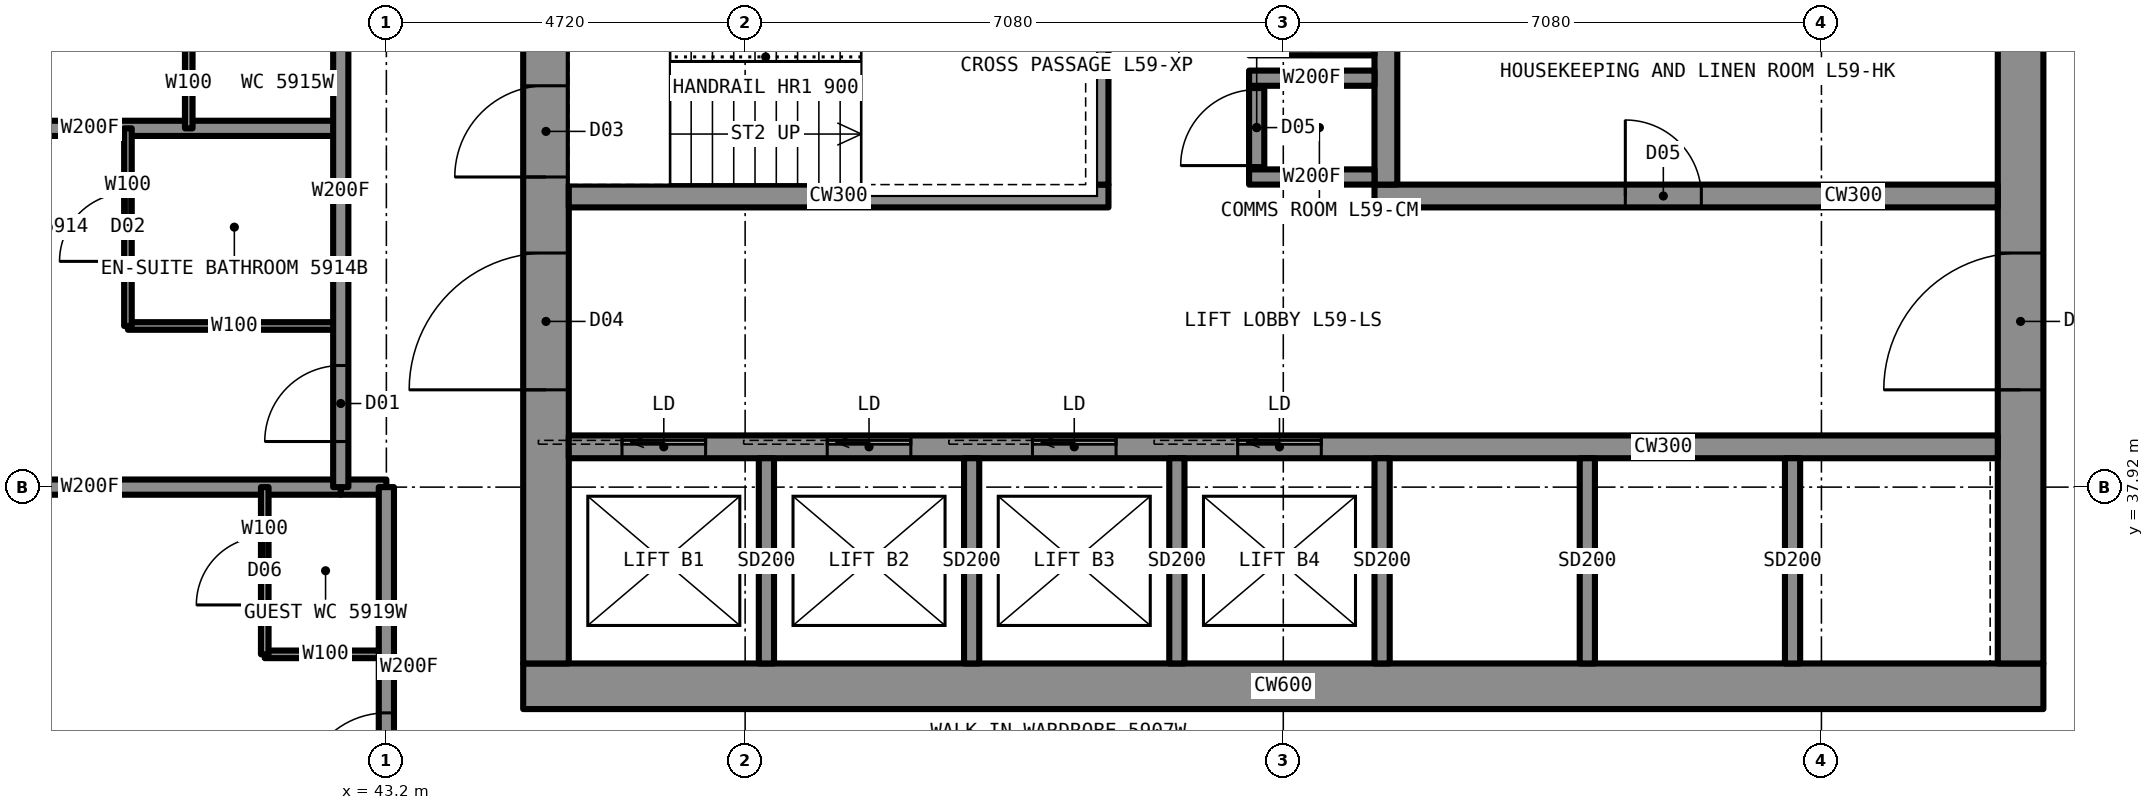
"""IFC4 building model, lengths in metres.
Left out: names, types, materials, properties, quantities, classifications, styles, units other than length and angle.
Written with IfcOpenShell. Run it as: python <this file> out.ifc"""

import sys

from ifc_helpers import new_model, si_unit, direction, frame, frame_2d, origin, place, context, subcontext, project, spatial, rectangle, extrude, element, fill, save


model = new_model("IFC4")
c1 = context("Model", 3, precision=1e-05, world=origin(), true_north=direction((0.0, 1.0)))
c2 = subcontext(c1, "Body", "Model", "MODEL_VIEW")
j1 = project(units=[si_unit("LENGTHUNIT", "METRE"), si_unit("PLANEANGLEUNIT", "RADIAN")], contexts=[c1])
p1 = place(None, origin())
s1 = spatial("IfcSite", under=j1, at=p1, CompositionType="ELEMENT")
p2 = place(p1, origin())
s2 = spatial("IfcBuilding", under=s1, at=p2, CompositionType="ELEMENT")
p3 = place(p2, frame((0.0, 0.0, 214.3)))
s3 = spatial("IfcBuildingStorey", under=s2, at=p3, CompositionType="ELEMENT", Elevation=214.3)
p4 = place(p3, frame((45.0, 35.3, 0.0), z_axis=(0.0, 0.0, 1.0), x_axis=(1.0, 0.0, 0.0)))
e1 = element("IfcWall", 1, at=p4, inside=s3, PredefinedType="SHEAR", context=c2, shape_type="SweptSolid", body=[
    extrude(rectangle(XDim=20.0, YDim=0.6, at=frame_2d((10.0, 0.0))), origin(), (0.0, 0.0, 1.0), 3.5),
])
p5 = place(p3, frame((64.7, 35.6, 0.0), z_axis=(0.0, 0.0, 1.0), x_axis=(0.0, 1.0, 0.0)))
e2 = element("IfcWall", 2, at=p5, inside=s3, PredefinedType="SHEAR", context=c2, shape_type="SweptSolid", body=[
    extrude(rectangle(XDim=18.8, YDim=0.6, at=frame_2d((9.4, 0.0))), origin(), (0.0, 0.0, 1.0), 3.5),
])
p6 = place(p5, frame((13.4, 0.0, 0.0)))
e3 = element("IfcOpeningElement", 3, at=p6, cuts=e2, PredefinedType="OPENING", context=c2, shape_type="SweptSolid", body=[
    extrude(rectangle(XDim=1.8, YDim=2.2, at=frame_2d((0.9, 1.1))), frame((0.0, 0.31, 0.0), z_axis=(0.0, -1.0, 0.0), x_axis=(1.0, 0.0, 0.0)), (0.0, 0.0, 1.0), 0.62),
])
p7 = place(p5, frame((3.6, 0.0, 0.0)))
e4 = element("IfcOpeningElement", 4, at=p7, cuts=e2, PredefinedType="OPENING", context=c2, shape_type="SweptSolid", body=[
    extrude(rectangle(XDim=1.8, YDim=2.2, at=frame_2d((0.9, 1.1))), frame((0.0, 0.31, 0.0), z_axis=(0.0, -1.0, 0.0), x_axis=(1.0, 0.0, 0.0)), (0.0, 0.0, 1.0), 0.62),
])
p8 = place(p3, frame((45.3, 35.6, 0.0), z_axis=(0.0, 0.0, 1.0), x_axis=(0.0, 1.0, 0.0)))
e5 = element("IfcWall", 5, at=p8, inside=s3, PredefinedType="SHEAR", context=c2, shape_type="SweptSolid", body=[
    extrude(rectangle(XDim=18.8, YDim=0.6, at=frame_2d((9.4, 0.0))), origin(), (0.0, 0.0, 1.0), 3.5),
])
p9 = place(p8, frame((13.4, 0.0, 0.0)))
e6 = element("IfcOpeningElement", 6, at=p9, cuts=e5, PredefinedType="OPENING", context=c2, shape_type="SweptSolid", body=[
    extrude(rectangle(XDim=1.8, YDim=2.2, at=frame_2d((0.9, 1.1))), frame((0.0, 0.31, 0.0), z_axis=(0.0, -1.0, 0.0), x_axis=(1.0, 0.0, 0.0)), (0.0, 0.0, 1.0), 0.62),
])
p10 = place(p8, frame((3.6, 0.0, 0.0)))
e7 = element("IfcOpeningElement", 7, at=p10, cuts=e5, PredefinedType="OPENING", context=c2, shape_type="SweptSolid", body=[
    extrude(rectangle(XDim=1.8, YDim=2.2, at=frame_2d((0.9, 1.1))), frame((0.0, 0.31, 0.0), z_axis=(0.0, -1.0, 0.0), x_axis=(1.0, 0.0, 0.0)), (0.0, 0.0, 1.0), 0.62),
])
p11 = place(p8, frame((6.4, 0.0, 0.0)))
e8 = element("IfcOpeningElement", 8, at=p11, cuts=e5, PredefinedType="OPENING", context=c2, shape_type="SweptSolid", body=[
    extrude(rectangle(XDim=1.2, YDim=2.2, at=frame_2d((0.6, 1.1))), frame((0.0, 0.31, 0.0), z_axis=(0.0, -1.0, 0.0), x_axis=(1.0, 0.0, 0.0)), (0.0, 0.0, 1.0), 0.62),
])
p12 = place(p3, frame((45.6, 38.45, 0.0), z_axis=(0.0, 0.0, 1.0), x_axis=(1.0, 0.0, 0.0)))
e9 = element("IfcWall", 9, at=p12, inside=s3, PredefinedType="SHEAR", context=c2, shape_type="SweptSolid", body=[
    extrude(rectangle(XDim=18.8, YDim=0.3, at=frame_2d((9.4, 0.0))), origin(), (0.0, 0.0, 1.0), 3.5),
])
p13 = place(p12, frame((0.7, 0.0, 0.0)))
e10 = element("IfcOpeningElement", 10, at=p13, cuts=e9, PredefinedType="OPENING", context=c2, shape_type="SweptSolid", body=[
    extrude(rectangle(XDim=1.1, YDim=2.2, at=frame_2d((0.55, 1.1))), frame((0.0, 0.16, 0.0), z_axis=(0.0, -1.0, 0.0), x_axis=(1.0, 0.0, 0.0)), (0.0, 0.0, 1.0), 0.32),
])
p14 = place(p12, frame((3.4, 0.0, 0.0)))
e11 = element("IfcOpeningElement", 11, at=p14, cuts=e9, PredefinedType="OPENING", context=c2, shape_type="SweptSolid", body=[
    extrude(rectangle(XDim=1.1, YDim=2.2, at=frame_2d((0.55, 1.1))), frame((0.0, 0.16, 0.0), z_axis=(0.0, -1.0, 0.0), x_axis=(1.0, 0.0, 0.0)), (0.0, 0.0, 1.0), 0.32),
])
p15 = place(p12, frame((6.1, 0.0, 0.0)))
e12 = element("IfcOpeningElement", 12, at=p15, cuts=e9, PredefinedType="OPENING", context=c2, shape_type="SweptSolid", body=[
    extrude(rectangle(XDim=1.1, YDim=2.2, at=frame_2d((0.55, 1.1))), frame((0.0, 0.16, 0.0), z_axis=(0.0, -1.0, 0.0), x_axis=(1.0, 0.0, 0.0)), (0.0, 0.0, 1.0), 0.32),
])
p16 = place(p12, frame((8.8, 0.0, 0.0)))
e13 = element("IfcOpeningElement", 13, at=p16, cuts=e9, PredefinedType="OPENING", context=c2, shape_type="SweptSolid", body=[
    extrude(rectangle(XDim=1.1, YDim=2.2, at=frame_2d((0.55, 1.1))), frame((0.0, 0.16, 0.0), z_axis=(0.0, -1.0, 0.0), x_axis=(1.0, 0.0, 0.0)), (0.0, 0.0, 1.0), 0.32),
])
p17 = place(p3, frame((45.6, 41.75, 0.0), z_axis=(0.0, 0.0, 1.0), x_axis=(1.0, 0.0, 0.0)))
e14 = element("IfcWall", 14, at=p17, inside=s3, PredefinedType="SHEAR", context=c2, shape_type="SweptSolid", body=[
    extrude(rectangle(XDim=7.1, YDim=0.3, at=frame_2d((3.55, 0.0))), origin(), (0.0, 0.0, 1.0), 3.5),
])
p18 = place(p3, frame((56.2, 41.75, 0.0), z_axis=(0.0, 0.0, 1.0), x_axis=(1.0, 0.0, 0.0)))
e15 = element("IfcWall", 15, at=p18, inside=s3, PredefinedType="SHEAR", context=c2, shape_type="SweptSolid", body=[
    extrude(rectangle(XDim=8.2, YDim=0.3, at=frame_2d((4.1, 0.0))), origin(), (0.0, 0.0, 1.0), 3.5),
])
p19 = place(p18, frame((3.3, 0.0, 0.0)))
e16 = element("IfcOpeningElement", 16, at=p19, cuts=e15, PredefinedType="OPENING", context=c2, shape_type="SweptSolid", body=[
    extrude(rectangle(XDim=1.0, YDim=2.1, at=frame_2d((0.5, 1.05))), frame((0.0, 0.16, 0.0), z_axis=(0.0, -1.0, 0.0), x_axis=(1.0, 0.0, 0.0)), (0.0, 0.0, 1.0), 0.32),
])
p20 = place(p3, frame((52.55, 41.9, 0.0), z_axis=(0.0, 0.0, 1.0), x_axis=(0.0, 1.0, 0.0)))
e17 = element("IfcWall", 17, at=p20, inside=s3, PredefinedType="SHEAR", context=c2, shape_type="SweptSolid", body=[
    extrude(rectangle(XDim=6.2, YDim=0.3, at=frame_2d((3.1, 0.0))), origin(), (0.0, 0.0, 1.0), 3.5),
])
p21 = place(p20, frame((4.125, 0.0, 0.0)))
e18 = element("IfcOpeningElement", 18, at=p21, cuts=e17, PredefinedType="OPENING", context=c2, shape_type="SweptSolid", body=[
    extrude(rectangle(XDim=1.2, YDim=2.2, at=frame_2d((0.6, 1.1))), frame((0.0, 0.16, 0.0), z_axis=(0.0, -1.0, 0.0), x_axis=(1.0, 0.0, 0.0)), (0.0, 0.0, 1.0), 0.32),
])
p22 = place(p3, frame((56.35, 41.9, 0.0), z_axis=(0.0, 0.0, 1.0), x_axis=(0.0, 1.0, 0.0)))
e19 = element("IfcWall", 19, at=p22, inside=s3, PredefinedType="SHEAR", context=c2, shape_type="SweptSolid", body=[
    extrude(rectangle(XDim=9.5, YDim=0.3, at=frame_2d((4.75, 0.0))), origin(), (0.0, 0.0, 1.0), 3.5),
])
p23 = place(p22, frame((7.1, 0.0, 0.0)))
e20 = element("IfcOpeningElement", 20, at=p23, cuts=e19, PredefinedType="OPENING", context=c2, shape_type="SweptSolid", body=[
    extrude(rectangle(XDim=1.8, YDim=2.2, at=frame_2d((0.9, 1.1))), frame((0.0, 0.16, 0.0), z_axis=(0.0, -1.0, 0.0), x_axis=(1.0, 0.0, 0.0)), (0.0, 0.0, 1.0), 0.32),
])
p24 = place(p3, frame((36.0, 42.64, 0.0), z_axis=(0.0, 0.0, 1.0), x_axis=(1.0, 0.0, 0.0)))
e21 = element("IfcWall", 21, at=p24, inside=s3, PredefinedType="PARTITIONING", context=c2, shape_type="SweptSolid", body=[
    extrude(rectangle(XDim=6.6, YDim=0.2, at=frame_2d((3.3, 0.0))), origin(), (0.0, 0.0, 1.0), 2.73),
])
p25 = place(p3, frame((39.8, 40.04, 0.0), z_axis=(0.0, 0.0, 1.0), x_axis=(1.0, 0.0, 0.0)))
e22 = element("IfcWall", 22, at=p25, inside=s3, PredefinedType="PARTITIONING", context=c2, shape_type="SweptSolid", body=[
    extrude(rectangle(XDim=2.8, YDim=0.1, at=frame_2d((1.4, 0.0))), origin(), (0.0, 0.0, 1.0), 3.33),
])
p26 = place(p3, frame((42.6, 37.92, 0.0), z_axis=(0.0, 0.0, 1.0), x_axis=(1.0, 0.0, 0.0)))
e23 = element("IfcWall", 23, at=p26, inside=s3, PredefinedType="PARTITIONING", context=c2, shape_type="SweptSolid", body=[
    extrude(rectangle(XDim=0.6, YDim=0.2, at=frame_2d((0.3, 0.0))), origin(), (0.0, 0.0, 1.0), 2.573),
])
p27 = place(p3, frame((36.0, 37.92, 0.0), z_axis=(0.0, 0.0, 1.0), x_axis=(1.0, 0.0, 0.0)))
e24 = element("IfcWall", 24, at=p27, inside=s3, PredefinedType="PARTITIONING", context=c2, shape_type="SweptSolid", body=[
    extrude(rectangle(XDim=6.6, YDim=0.2, at=frame_2d((3.3, 0.0))), origin(), (0.0, 0.0, 1.0), 2.573),
])
p28 = place(p3, frame((41.6, 35.72, 0.0), z_axis=(0.0, 0.0, 1.0), x_axis=(1.0, 0.0, 0.0)))
e25 = element("IfcWall", 25, at=p28, inside=s3, PredefinedType="PARTITIONING", context=c2, shape_type="SweptSolid", body=[
    extrude(rectangle(XDim=1.6, YDim=0.1, at=frame_2d((0.8, 0.0))), origin(), (0.0, 0.0, 1.0), 3.33),
])
p29 = place(p3, frame((43.2, 33.2, 0.0), z_axis=(0.0, 0.0, 1.0), x_axis=(0.0, 1.0, 0.0)))
e26 = element("IfcWall", 26, at=p29, inside=s3, PredefinedType="PARTITIONING", context=c2, shape_type="SweptSolid", body=[
    extrude(rectangle(XDim=4.72, YDim=0.2, at=frame_2d((2.36, 0.0))), origin(), (0.0, 0.0, 1.0), 3.33),
])
p30 = place(p29, frame((0.65, 0.0, 0.0)))
e27 = element("IfcOpeningElement", 27, at=p30, cuts=e26, PredefinedType="OPENING", context=c2, shape_type="SweptSolid", body=[
    extrude(rectangle(XDim=1.1, YDim=2.2, at=frame_2d((0.55, 1.1))), frame((0.0, 0.11, 0.0), z_axis=(0.0, -1.0, 0.0), x_axis=(1.0, 0.0, 0.0)), (0.0, 0.0, 1.0), 0.22),
])
p31 = place(p3, frame((42.6, 37.92, 0.0), z_axis=(0.0, 0.0, 1.0), x_axis=(0.0, 1.0, 0.0)))
e28 = element("IfcWall", 28, at=p31, inside=s3, PredefinedType="PARTITIONING", context=c2, shape_type="SweptSolid", body=[
    extrude(rectangle(XDim=14.16, YDim=0.2, at=frame_2d((7.08, 0.0))), origin(), (0.0, 0.0, 1.0), 3.33),
])
p32 = place(p31, frame((0.4, 0.0, 0.0)))
e29 = element("IfcOpeningElement", 29, at=p32, cuts=e28, PredefinedType="OPENING", context=c2, shape_type="SweptSolid", body=[
    extrude(rectangle(XDim=1.0, YDim=2.2, at=frame_2d((0.5, 1.1))), frame((0.0, 0.11, 0.0), z_axis=(0.0, -1.0, 0.0), x_axis=(1.0, 0.0, 0.0)), (0.0, 0.0, 1.0), 0.22),
])
p33 = place(p31, frame((6.18, 0.0, 0.0)))
e30 = element("IfcOpeningElement", 30, at=p33, cuts=e28, PredefinedType="OPENING", context=c2, shape_type="SweptSolid", body=[
    extrude(rectangle(XDim=1.0, YDim=2.2, at=frame_2d((0.5, 1.1))), frame((0.0, 0.11, 0.0), z_axis=(0.0, -1.0, 0.0), x_axis=(1.0, 0.0, 0.0)), (0.0, 0.0, 1.0), 0.22),
])
p34 = place(p31, frame((11.7, 0.0, 0.0)))
e31 = element("IfcOpeningElement", 31, at=p34, cuts=e28, PredefinedType="OPENING", context=c2, shape_type="SweptSolid", body=[
    extrude(rectangle(XDim=1.0, YDim=2.2, at=frame_2d((0.5, 1.1))), frame((0.0, 0.11, 0.0), z_axis=(0.0, -1.0, 0.0), x_axis=(1.0, 0.0, 0.0)), (0.0, 0.0, 1.0), 0.22),
])
p35 = place(p3, frame((41.6, 35.72, 0.0), z_axis=(0.0, 0.0, 1.0), x_axis=(0.0, 1.0, 0.0)))
e32 = element("IfcWall", 32, at=p35, inside=s3, PredefinedType="PARTITIONING", context=c2, shape_type="SweptSolid", body=[
    extrude(rectangle(XDim=2.2, YDim=0.1, at=frame_2d((1.1, 0.0))), origin(), (0.0, 0.0, 1.0), 3.33),
])
p36 = place(p35, frame((0.65, 0.0, 0.0)))
e33 = element("IfcOpeningElement", 33, at=p36, cuts=e32, PredefinedType="OPENING", context=c2, shape_type="SweptSolid", body=[
    extrude(rectangle(XDim=0.9, YDim=2.1, at=frame_2d((0.45, 1.05))), frame((0.0, 0.06, 0.0), z_axis=(0.0, -1.0, 0.0), x_axis=(1.0, 0.0, 0.0)), (0.0, 0.0, 1.0), 0.12),
])
p37 = place(p3, frame((40.6, 42.64, 0.0), z_axis=(0.0, 0.0, 1.0), x_axis=(0.0, 1.0, 0.0)))
e34 = element("IfcWall", 34, at=p37, inside=s3, PredefinedType="PARTITIONING", context=c2, shape_type="SweptSolid", body=[
    extrude(rectangle(XDim=1.2, YDim=0.1, at=frame_2d((0.6, 0.0))), origin(), (0.0, 0.0, 1.0), 3.33),
])
p38 = place(p3, frame((39.8, 40.04, 0.0), z_axis=(0.0, 0.0, 1.0), x_axis=(0.0, 1.0, 0.0)))
e35 = element("IfcWall", 35, at=p38, inside=s3, PredefinedType="PARTITIONING", context=c2, shape_type="SweptSolid", body=[
    extrude(rectangle(XDim=2.6, YDim=0.1, at=frame_2d((1.3, 0.0))), origin(), (0.0, 0.0, 1.0), 3.33),
])
p39 = place(p38, frame((0.85, 0.0, 0.0)))
e36 = element("IfcOpeningElement", 36, at=p39, cuts=e35, PredefinedType="OPENING", context=c2, shape_type="SweptSolid", body=[
    extrude(rectangle(XDim=0.9, YDim=2.1, at=frame_2d((0.45, 1.05))), frame((0.0, 0.06, 0.0), z_axis=(0.0, -1.0, 0.0), x_axis=(1.0, 0.0, 0.0)), (0.0, 0.0, 1.0), 0.12),
])
p40 = place(p3, frame((54.35, 42.0, 0.0), z_axis=(0.0, 0.0, 1.0), x_axis=(0.0, 1.0, 0.0)))
e37 = element("IfcWall", 37, at=p40, inside=s3, PredefinedType="PARTITIONING", context=c2, shape_type="SweptSolid", body=[
    extrude(rectangle(XDim=1.7, YDim=0.2, at=frame_2d((0.85, 0.0))), origin(), (0.0, 0.0, 1.0), 3.33),
])
p41 = place(p40, frame((0.35, 0.0, 0.0)))
e38 = element("IfcOpeningElement", 38, at=p41, cuts=e37, PredefinedType="OPENING", context=c2, shape_type="SweptSolid", body=[
    extrude(rectangle(XDim=1.0, YDim=2.1, at=frame_2d((0.5, 1.05))), frame((0.0, 0.11, 0.0), z_axis=(0.0, -1.0, 0.0), x_axis=(1.0, 0.0, 0.0)), (0.0, 0.0, 1.0), 0.22),
])
for number, where, z_axis, x_axis in (
    (39, (54.25, 42.0, 0.0), (0.0, 0.0, 1.0), (1.0, 0.0, 0.0)),
    (40, (54.25, 43.7, 0.0), (0.0, 0.0, 1.0), (1.0, 0.0, 0.0)),
):
    element("IfcWall", number, at=place(p3, frame(where, z_axis=z_axis, x_axis=x_axis)), inside=s3, PredefinedType="PARTITIONING", context=c2, shape_type="SweptSolid", body=[
        extrude(rectangle(XDim=1.95, YDim=0.2, at=frame_2d((0.975, 0.0))), origin(), (0.0, 0.0, 1.0), 3.33),
    ])
for number, where, z_axis, x_axis in (
    (41, (48.2, 35.6, 0.0), (0.0, 0.0, 1.0), (0.0, 1.0, 0.0)),
    (42, (50.9, 35.6, 0.0), (0.0, 0.0, 1.0), (0.0, 1.0, 0.0)),
    (43, (53.6, 35.6, 0.0), (0.0, 0.0, 1.0), (0.0, 1.0, 0.0)),
    (44, (56.3, 35.6, 0.0), (0.0, 0.0, 1.0), (0.0, 1.0, 0.0)),
    (45, (59.0, 35.6, 0.0), (0.0, 0.0, 1.0), (0.0, 1.0, 0.0)),
    (46, (61.7, 35.6, 0.0), (0.0, 0.0, 1.0), (0.0, 1.0, 0.0)),
):
    element("IfcWall", number, at=place(p3, frame(where, z_axis=z_axis, x_axis=x_axis)), inside=s3, PredefinedType="PARTITIONING", context=c2, shape_type="SweptSolid", body=[
        extrude(rectangle(XDim=2.7, YDim=0.2, at=frame_2d((1.35, 0.0))), origin(), (0.0, 0.0, 1.0), 3.33),
    ])
p42 = place(p32, origin())
e47 = element("IfcDoor", 47, at=p42, inside=s3, OperationType="SINGLE_SWING_LEFT", PredefinedType="DOOR", context=c2, shape_type="SweptSolid", body=[
    extrude(rectangle(XDim=1.0, YDim=2.2, at=frame_2d((0.5, 1.1))), frame((0.0, 0.025, 0.0), z_axis=(0.0, -1.0, 0.0), x_axis=(1.0, 0.0, 0.0)), (0.0, 0.0, 1.0), 0.05),
])
fill(e29, e47)
p43 = place(p39, origin())
e48 = element("IfcDoor", 48, at=p43, inside=s3, OperationType="SINGLE_SWING_RIGHT", PredefinedType="DOOR", context=c2, shape_type="SweptSolid", body=[
    extrude(rectangle(XDim=0.9, YDim=2.1, at=frame_2d((0.45, 1.05))), frame((0.0, 0.025, 0.0), z_axis=(0.0, -1.0, 0.0), x_axis=(1.0, 0.0, 0.0)), (0.0, 0.0, 1.0), 0.05),
])
fill(e36, e48)
p44 = place(p30, origin())
e49 = element("IfcDoor", 49, at=p44, inside=s3, OperationType="SINGLE_SWING_LEFT", PredefinedType="DOOR", context=c2, shape_type="SweptSolid", body=[
    extrude(rectangle(XDim=1.1, YDim=2.2, at=frame_2d((0.55, 1.1))), frame((0.0, 0.025, 0.0), z_axis=(0.0, -1.0, 0.0), x_axis=(1.0, 0.0, 0.0)), (0.0, 0.0, 1.0), 0.05),
])
fill(e27, e49)
p45 = place(p36, origin())
e50 = element("IfcDoor", 50, at=p45, inside=s3, OperationType="SINGLE_SWING_LEFT", PredefinedType="DOOR", context=c2, shape_type="SweptSolid", body=[
    extrude(rectangle(XDim=0.9, YDim=2.1, at=frame_2d((0.45, 1.05))), frame((0.0, 0.025, 0.0), z_axis=(0.0, -1.0, 0.0), x_axis=(1.0, 0.0, 0.0)), (0.0, 0.0, 1.0), 0.05),
])
fill(e33, e50)
p46 = place(p41, origin())
e51 = element("IfcDoor", 51, at=p46, inside=s3, OperationType="SINGLE_SWING_LEFT", PredefinedType="DOOR", context=c2, shape_type="SweptSolid", body=[
    extrude(rectangle(XDim=1.0, YDim=2.1, at=frame_2d((0.5, 1.05))), frame((0.0, 0.025, 0.0), z_axis=(0.0, -1.0, 0.0), x_axis=(1.0, 0.0, 0.0)), (0.0, 0.0, 1.0), 0.05),
])
fill(e38, e51)
p47 = place(p10, origin())
e52 = element("IfcDoor", 52, at=p47, inside=s3, OperationType="DOUBLE_DOOR_SINGLE_SWING", PredefinedType="DOOR", context=c2, shape_type="SweptSolid", body=[
    extrude(rectangle(XDim=1.8, YDim=2.2, at=frame_2d((0.9, 1.1))), frame((0.0, 0.025, 0.0), z_axis=(0.0, -1.0, 0.0), x_axis=(1.0, 0.0, 0.0)), (0.0, 0.0, 1.0), 0.05),
])
fill(e7, e52)
p48 = place(p7, origin())
e53 = element("IfcDoor", 53, at=p48, inside=s3, OperationType="DOUBLE_DOOR_SINGLE_SWING", PredefinedType="DOOR", context=c2, shape_type="SweptSolid", body=[
    extrude(rectangle(XDim=1.8, YDim=2.2, at=frame_2d((0.9, 1.1))), frame((0.0, 0.025, 0.0), z_axis=(0.0, -1.0, 0.0), x_axis=(1.0, 0.0, 0.0)), (0.0, 0.0, 1.0), 0.05),
])
fill(e4, e53)
p49 = place(p11, origin())
e54 = element("IfcDoor", 54, at=p49, inside=s3, OperationType="SINGLE_SWING_LEFT", PredefinedType="DOOR", context=c2, shape_type="SweptSolid", body=[
    extrude(rectangle(XDim=1.2, YDim=2.2, at=frame_2d((0.6, 1.1))), frame((0.0, 0.025, 0.0), z_axis=(0.0, -1.0, 0.0), x_axis=(1.0, 0.0, 0.0)), (0.0, 0.0, 1.0), 0.05),
])
fill(e8, e54)
p50 = place(p19, origin())
e55 = element("IfcDoor", 55, at=p50, inside=s3, OperationType="SINGLE_SWING_LEFT", PredefinedType="DOOR", context=c2, shape_type="SweptSolid", body=[
    extrude(rectangle(XDim=1.0, YDim=2.1, at=frame_2d((0.5, 1.05))), frame((0.0, 0.025, 0.0), z_axis=(0.0, -1.0, 0.0), x_axis=(1.0, 0.0, 0.0)), (0.0, 0.0, 1.0), 0.05),
])
fill(e16, e55)
p51 = place(p13, origin())
e56 = element("IfcDoor", 56, at=p51, inside=s3, OperationType="SLIDING_TO_LEFT", PredefinedType="DOOR", context=c2, shape_type="SweptSolid", body=[
    extrude(rectangle(XDim=1.1, YDim=2.2, at=frame_2d((0.55, 1.1))), frame((0.0, 0.025, 0.0), z_axis=(0.0, -1.0, 0.0), x_axis=(1.0, 0.0, 0.0)), (0.0, 0.0, 1.0), 0.05),
])
fill(e10, e56)
p52 = place(p14, origin())
e57 = element("IfcDoor", 57, at=p52, inside=s3, OperationType="SLIDING_TO_LEFT", PredefinedType="DOOR", context=c2, shape_type="SweptSolid", body=[
    extrude(rectangle(XDim=1.1, YDim=2.2, at=frame_2d((0.55, 1.1))), frame((0.0, 0.025, 0.0), z_axis=(0.0, -1.0, 0.0), x_axis=(1.0, 0.0, 0.0)), (0.0, 0.0, 1.0), 0.05),
])
fill(e11, e57)
p53 = place(p15, origin())
e58 = element("IfcDoor", 58, at=p53, inside=s3, OperationType="SLIDING_TO_LEFT", PredefinedType="DOOR", context=c2, shape_type="SweptSolid", body=[
    extrude(rectangle(XDim=1.1, YDim=2.2, at=frame_2d((0.55, 1.1))), frame((0.0, 0.025, 0.0), z_axis=(0.0, -1.0, 0.0), x_axis=(1.0, 0.0, 0.0)), (0.0, 0.0, 1.0), 0.05),
])
fill(e12, e58)
p54 = place(p16, origin())
e59 = element("IfcDoor", 59, at=p54, inside=s3, OperationType="SLIDING_TO_LEFT", PredefinedType="DOOR", context=c2, shape_type="SweptSolid", body=[
    extrude(rectangle(XDim=1.1, YDim=2.2, at=frame_2d((0.55, 1.1))), frame((0.0, 0.025, 0.0), z_axis=(0.0, -1.0, 0.0), x_axis=(1.0, 0.0, 0.0)), (0.0, 0.0, 1.0), 0.05),
])
fill(e13, e59)
save(model, sys.argv[1])
